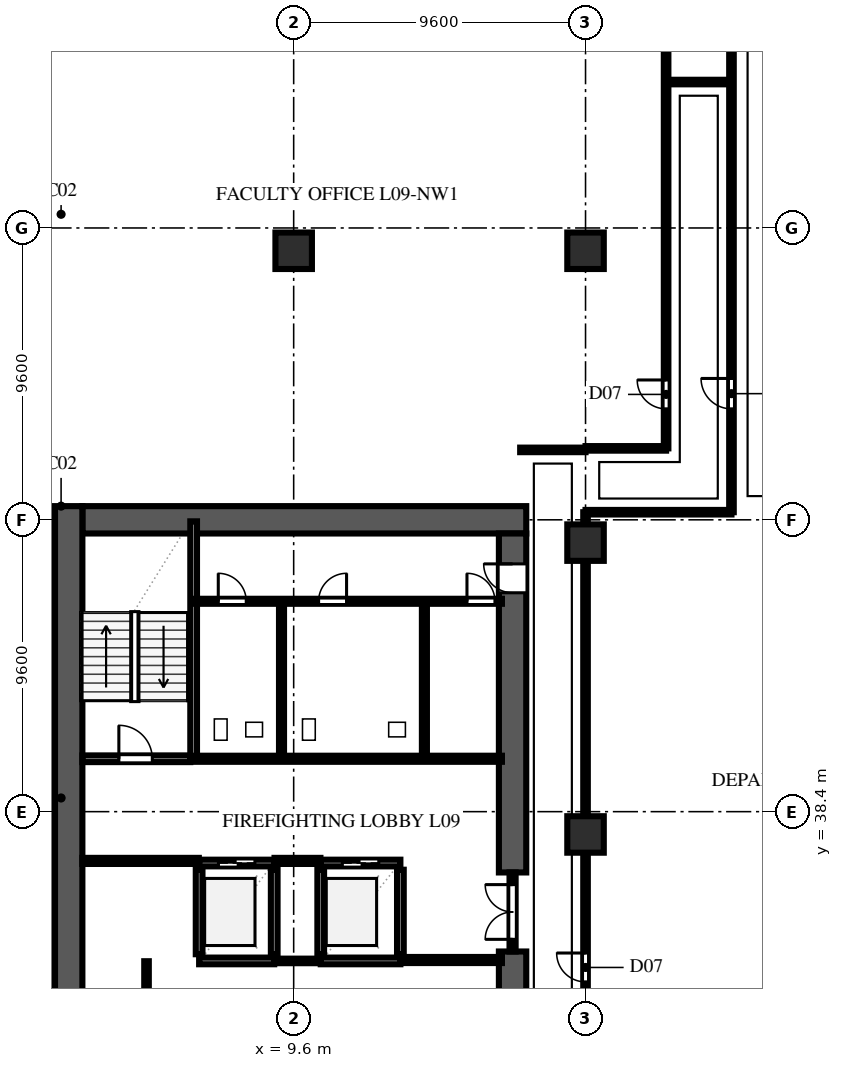
"""IFC4 building model, lengths in metres.
Left out: names, types, materials, properties, quantities, classifications, styles, units other than length and angle.
Written with IfcOpenShell. Run it as: python <this file> out.ifc"""

import sys

from ifc_helpers import new_model, si_unit, direction, frame, frame_2d, origin, origin_2d, place, context, subcontext, project, spatial, rectangle, extrude, element, fill, save


model = new_model("IFC4")
c1 = context("Model", 3, precision=1e-05, world=origin(), true_north=direction((0.0, 1.0)))
c2 = subcontext(c1, "Body", "Model", "MODEL_VIEW")
j1 = project(units=[si_unit("LENGTHUNIT", "METRE"), si_unit("PLANEANGLEUNIT", "RADIAN")], contexts=[c1])
p1 = place(None, origin())
s1 = spatial("IfcSite", under=j1, at=p1, CompositionType="ELEMENT")
p2 = place(p1, origin())
s2 = spatial("IfcBuilding", under=s1, at=p2, CompositionType="ELEMENT")
p3 = place(p2, frame((0.0, 0.0, 39.4)))
s3 = spatial("IfcBuildingStorey", under=s2, at=p3, CompositionType="ELEMENT", Elevation=39.4)
p4 = place(p3, frame((2.65, 48.0, 0.0), z_axis=(0.0, 0.0, 1.0), x_axis=(1.0, 0.0, 0.0)))
e1 = element("IfcWall", 1, at=p4, inside=s3, PredefinedType="SHEAR", context=c2, shape_type="SweptSolid", body=[
    extrude(rectangle(XDim=14.6, YDim=0.9, at=frame_2d((7.3, 0.0))), origin(), (0.0, 0.0, 1.0), 3.54),
])
p5 = place(p3, frame((2.2, 9.15, 0.0), z_axis=(0.0, 0.0, 1.0), x_axis=(0.0, 1.0, 0.0)))
e2 = element("IfcWall", 2, at=p5, inside=s3, PredefinedType="SHEAR", context=c2, shape_type="SweptSolid", body=[
    extrude(rectangle(XDim=39.3, YDim=0.9, at=frame_2d((19.65, 0.0))), origin(), (0.0, 0.0, 1.0), 3.54),
])
p6 = place(p3, frame((16.8, 26.0, 0.0), z_axis=(0.0, 0.0, 1.0), x_axis=(0.0, 1.0, 0.0)))
e3 = element("IfcWall", 3, at=p6, inside=s3, PredefinedType="SHEAR", context=c2, shape_type="SweptSolid", body=[
    extrude(rectangle(XDim=7.8, YDim=0.9, at=frame_2d((3.9, 0.0))), origin(), (0.0, 0.0, 1.0), 3.54),
])
p7 = place(p3, frame((16.8, 36.4, 0.0), z_axis=(0.0, 0.0, 1.0), x_axis=(0.0, 1.0, 0.0)))
e4 = element("IfcWall", 4, at=p7, inside=s3, PredefinedType="SHEAR", context=c2, shape_type="SweptSolid", body=[
    extrude(rectangle(XDim=11.15, YDim=0.9, at=frame_2d((5.575, 0.0))), origin(), (0.0, 0.0, 1.0), 3.54),
])
p8 = place(p7, frame((9.2, 0.0, 0.0)))
e5 = element("IfcOpeningElement", 5, at=p8, cuts=e4, PredefinedType="OPENING", context=c2, shape_type="SweptSolid", body=[
    extrude(rectangle(XDim=0.95, YDim=2.15, at=frame_2d((0.475, 1.075))), frame((0.0, 0.462, 0.0), z_axis=(0.0, -1.0, 0.0), x_axis=(1.0, 0.0, 0.0)), (0.0, 0.0, 1.0), 0.924),
])
for number, where, z_axis, x_axis in (
    (6, (9.6, 56.85, 0.0), (0.0, 0.0, 1.0), (1.0, 0.0, 0.0)),
    (7, (19.2, 37.65, 0.0), (0.0, 0.0, 1.0), (1.0, 0.0, 0.0)),
    (8, (19.2, 47.25, 0.0), (0.0, 0.0, 1.0), (1.0, 0.0, 0.0)),
    (9, (19.2, 56.85, 0.0), (0.0, 0.0, 1.0), (1.0, 0.0, 0.0)),
):
    element("IfcColumn", number, at=place(p3, frame(where, z_axis=z_axis, x_axis=x_axis)), inside=s3, PredefinedType="COLUMN", context=c2, shape_type="SweptSolid", body=[
        extrude(rectangle(XDim=1.2, YDim=1.2, at=origin_2d()), origin(), (0.0, 0.0, 1.0), 3.8),
    ])
p9 = place(p3, frame((2.65, 40.14, 0.0), z_axis=(0.0, 0.0, 1.0), x_axis=(1.0, 0.0, 0.0)))
e10 = element("IfcWall", 10, at=p9, inside=s3, PredefinedType="SOLIDWALL", context=c2, shape_type="SweptSolid", body=[
    extrude(rectangle(XDim=3.55, YDim=0.22, at=frame_2d((1.775, 0.0))), origin(), (0.0, 0.0, 1.0), 3.54),
])
p10 = place(p9, frame((1.2, 0.0, 0.0)))
e11 = element("IfcOpeningElement", 11, at=p10, cuts=e10, PredefinedType="OPENING", context=c2, shape_type="SweptSolid", body=[
    extrude(rectangle(XDim=1.1, YDim=2.2, at=frame_2d((0.55, 1.1))), frame((0.0, 0.122, 0.0), z_axis=(0.0, -1.0, 0.0), x_axis=(1.0, 0.0, 0.0)), (0.0, 0.0, 1.0), 0.244),
])
p11 = place(p3, frame((6.31, 40.14, 0.0), z_axis=(0.0, 0.0, 1.0), x_axis=(0.0, 1.0, 0.0)))
e12 = element("IfcWall", 12, at=p11, inside=s3, PredefinedType="SOLIDWALL", context=c2, shape_type="SweptSolid", body=[
    extrude(rectangle(XDim=7.81, YDim=0.22, at=frame_2d((3.905, 0.0))), origin(), (0.0, 0.0, 1.0), 3.54),
])
for number, where, z_axis, x_axis in (
    (13, (6.49, 33.71, 0.0), (0.0, 0.0, 1.0), (0.0, 1.0, 0.0)),
    (14, (8.96, 33.71, 0.0), (0.0, 0.0, 1.0), (0.0, 1.0, 0.0)),
):
    element("IfcWall", number, at=place(p3, frame(where, z_axis=z_axis, x_axis=x_axis)), inside=s3, PredefinedType="SOLIDWALL", context=c2, shape_type="SweptSolid", body=[
        extrude(rectangle(XDim=2.78, YDim=0.22, at=frame_2d((1.39, 0.0))), origin(), (0.0, 0.0, 1.0), 3.54),
    ])
p12 = place(p3, frame((6.49, 33.49, 0.0), z_axis=(0.0, 0.0, 1.0), x_axis=(1.0, 0.0, 0.0)))
e15 = element("IfcWall", 15, at=p12, inside=s3, PredefinedType="SOLIDWALL", context=c2, shape_type="SweptSolid", body=[
    extrude(rectangle(XDim=2.47, YDim=0.22, at=frame_2d((1.235, 0.0))), origin(), (0.0, 0.0, 1.0), 3.54),
])
p13 = place(p3, frame((6.49, 36.71, 0.0), z_axis=(0.0, 0.0, 1.0), x_axis=(1.0, 0.0, 0.0)))
e16 = element("IfcWall", 16, at=p13, inside=s3, PredefinedType="SOLIDWALL", context=c2, shape_type="SweptSolid", body=[
    extrude(rectangle(XDim=2.47, YDim=0.22, at=frame_2d((1.235, 0.0))), origin(), (0.0, 0.0, 1.0), 3.54),
])
p14 = place(p13, frame((0.635, 0.0, 0.0)))
e17 = element("IfcOpeningElement", 17, at=p14, cuts=e16, PredefinedType="OPENING", context=c2, shape_type="SweptSolid", body=[
    extrude(rectangle(XDim=1.2, YDim=2.2, at=frame_2d((0.6, 1.1))), frame((0.0, 0.122, 0.0), z_axis=(0.0, -1.0, 0.0), x_axis=(1.0, 0.0, 0.0)), (0.0, 0.0, 1.0), 0.244),
])
for number, where, z_axis, x_axis in (
    (18, (10.49, 33.71, 0.0), (0.0, 0.0, 1.0), (0.0, 1.0, 0.0)),
    (19, (13.11, 33.71, 0.0), (0.0, 0.0, 1.0), (0.0, 1.0, 0.0)),
):
    element("IfcWall", number, at=place(p3, frame(where, z_axis=z_axis, x_axis=x_axis)), inside=s3, PredefinedType="SOLIDWALL", context=c2, shape_type="SweptSolid", body=[
        extrude(rectangle(XDim=2.78, YDim=0.22, at=frame_2d((1.39, 0.0))), origin(), (0.0, 0.0, 1.0), 3.54),
    ])
p15 = place(p3, frame((10.49, 33.49, 0.0), z_axis=(0.0, 0.0, 1.0), x_axis=(1.0, 0.0, 0.0)))
e20 = element("IfcWall", 20, at=p15, inside=s3, PredefinedType="SOLIDWALL", context=c2, shape_type="SweptSolid", body=[
    extrude(rectangle(XDim=2.62, YDim=0.22, at=frame_2d((1.31, 0.0))), origin(), (0.0, 0.0, 1.0), 3.54),
])
p16 = place(p3, frame((10.49, 36.71, 0.0), z_axis=(0.0, 0.0, 1.0), x_axis=(1.0, 0.0, 0.0)))
e21 = element("IfcWall", 21, at=p16, inside=s3, PredefinedType="SOLIDWALL", context=c2, shape_type="SweptSolid", body=[
    extrude(rectangle(XDim=2.62, YDim=0.22, at=frame_2d((1.31, 0.0))), origin(), (0.0, 0.0, 1.0), 3.54),
])
p17 = place(p16, frame((0.71, 0.0, 0.0)))
e22 = element("IfcOpeningElement", 22, at=p17, cuts=e21, PredefinedType="OPENING", context=c2, shape_type="SweptSolid", body=[
    extrude(rectangle(XDim=1.2, YDim=2.2, at=frame_2d((0.6, 1.1))), frame((0.0, 0.122, 0.0), z_axis=(0.0, -1.0, 0.0), x_axis=(1.0, 0.0, 0.0)), (0.0, 0.0, 1.0), 0.244),
])
p18 = place(p3, frame((2.65, 36.78, 0.0), z_axis=(0.0, 0.0, 1.0), x_axis=(1.0, 0.0, 0.0)))
e23 = element("IfcWall", 23, at=p18, inside=s3, PredefinedType="SOLIDWALL", context=c2, shape_type="SweptSolid", body=[
    extrude(rectangle(XDim=3.83, YDim=0.2, at=frame_2d((1.915, 0.0))), origin(), (0.0, 0.0, 1.0), 3.54),
])
p19 = place(p3, frame((8.97, 36.78, 0.0), z_axis=(0.0, 0.0, 1.0), x_axis=(1.0, 0.0, 0.0)))
e24 = element("IfcWall", 24, at=p19, inside=s3, PredefinedType="SOLIDWALL", context=c2, shape_type="SweptSolid", body=[
    extrude(rectangle(XDim=1.51, YDim=0.2, at=frame_2d((0.755, 0.0))), origin(), (0.0, 0.0, 1.0), 3.54),
])
p20 = place(p3, frame((13.12, 33.52, 0.0), z_axis=(0.0, 0.0, 1.0), x_axis=(1.0, 0.0, 0.0)))
e25 = element("IfcWall", 25, at=p20, inside=s3, PredefinedType="SOLIDWALL", context=c2, shape_type="SweptSolid", body=[
    extrude(rectangle(XDim=3.33, YDim=0.2, at=frame_2d((1.665, 0.0))), origin(), (0.0, 0.0, 1.0), 3.54),
])
p21 = place(p3, frame((6.32, 40.14, 0.0), z_axis=(0.0, 0.0, 1.0), x_axis=(1.0, 0.0, 0.0)))
e26 = element("IfcWall", 26, at=p21, inside=s3, PredefinedType="SOLIDWALL", context=c2, shape_type="SweptSolid", body=[
    extrude(rectangle(XDim=10.13, YDim=0.2, at=frame_2d((5.065, 0.0))), origin(), (0.0, 0.0, 1.0), 3.54),
])
p22 = place(p3, frame((16.8, 33.8, 0.0), z_axis=(0.0, 0.0, 1.0), x_axis=(0.0, 1.0, 0.0)))
e27 = element("IfcWall", 27, at=p22, inside=s3, PredefinedType="SOLIDWALL", context=c2, shape_type="SweptSolid", body=[
    extrude(rectangle(XDim=2.6, YDim=0.2, at=frame_2d((1.3, 0.0))), origin(), (0.0, 0.0, 1.0), 3.54),
])
p23 = place(p22, frame((0.4, 0.0, 0.0)))
e28 = element("IfcOpeningElement", 28, at=p23, cuts=e27, PredefinedType="OPENING", context=c2, shape_type="SweptSolid", body=[
    extrude(rectangle(XDim=1.8, YDim=2.2, at=frame_2d((0.9, 1.1))), frame((0.0, 0.112, 0.0), z_axis=(0.0, -1.0, 0.0), x_axis=(1.0, 0.0, 0.0)), (0.0, 0.0, 1.0), 0.224),
])
p24 = place(p3, frame((8.965, 33.49, 0.0), z_axis=(0.0, 0.0, 1.0), x_axis=(1.0, 0.0, 0.0)))
e29 = element("IfcWall", 29, at=p24, inside=s3, PredefinedType="PARTITIONING", context=c2, shape_type="SweptSolid", body=[
    extrude(rectangle(XDim=1.52, YDim=0.15, at=frame_2d((0.76, 0.0))), origin(), (0.0, 0.0, 1.0), 3.54),
])
p25 = place(p3, frame((4.76, 30.55, 0.0), z_axis=(0.0, 0.0, 1.0), x_axis=(0.0, 1.0, 0.0)))
e30 = element("IfcWall", 30, at=p25, inside=s3, PredefinedType="PARTITIONING", context=c2, shape_type="SweptSolid", body=[
    extrude(rectangle(XDim=2.93, YDim=0.15, at=frame_2d((1.465, 0.0))), origin(), (0.0, 0.0, 1.0), 3.54),
])
p26 = place(p25, frame((0.6, 0.0, 0.0)))
e31 = element("IfcOpeningElement", 31, at=p26, cuts=e30, PredefinedType="OPENING", context=c2, shape_type="SweptSolid", body=[
    extrude(rectangle(XDim=0.85, YDim=2.1, at=frame_2d((0.425, 1.05))), frame((0.0, 0.087, 0.0), z_axis=(0.0, -1.0, 0.0), x_axis=(1.0, 0.0, 0.0)), (0.0, 0.0, 1.0), 0.174),
])
p27 = place(p3, frame((6.32, 45.32, 0.0), z_axis=(0.0, 0.0, 1.0), x_axis=(1.0, 0.0, 0.0)))
e32 = element("IfcWall", 32, at=p27, inside=s3, PredefinedType="PLUMBINGWALL", context=c2, shape_type="SweptSolid", body=[
    extrude(rectangle(XDim=10.13, YDim=0.165, at=frame_2d((5.065, 0.0))), origin(), (0.0, 0.0, 1.0), 3.54),
])
p28 = place(p27, frame((0.8, 0.0, 0.0)))
e33 = element("IfcOpeningElement", 33, at=p28, cuts=e32, PredefinedType="OPENING", context=c2, shape_type="SweptSolid", body=[
    extrude(rectangle(XDim=0.92, YDim=2.15, at=frame_2d((0.46, 1.075))), frame((0.0, 0.094, 0.0), z_axis=(0.0, -1.0, 0.0), x_axis=(1.0, 0.0, 0.0)), (0.0, 0.0, 1.0), 0.189),
])
p29 = place(p27, frame((4.1, 0.0, 0.0)))
e34 = element("IfcOpeningElement", 34, at=p29, cuts=e32, PredefinedType="OPENING", context=c2, shape_type="SweptSolid", body=[
    extrude(rectangle(XDim=0.92, YDim=2.15, at=frame_2d((0.46, 1.075))), frame((0.0, 0.094, 0.0), z_axis=(0.0, -1.0, 0.0), x_axis=(1.0, 0.0, 0.0)), (0.0, 0.0, 1.0), 0.189),
])
p30 = place(p27, frame((8.98, 0.0, 0.0)))
e35 = element("IfcOpeningElement", 35, at=p30, cuts=e32, PredefinedType="OPENING", context=c2, shape_type="SweptSolid", body=[
    extrude(rectangle(XDim=0.92, YDim=2.15, at=frame_2d((0.46, 1.075))), frame((0.0, 0.094, 0.0), z_axis=(0.0, -1.0, 0.0), x_axis=(1.0, 0.0, 0.0)), (0.0, 0.0, 1.0), 0.189),
])
for number, where, z_axis, x_axis in (
    (36, (9.2, 40.4, 0.0), (0.0, 0.0, 1.0), (0.0, 1.0, 0.0)),
    (37, (13.9, 40.4, 0.0), (0.0, 0.0, 1.0), (0.0, 1.0, 0.0)),
):
    element("IfcWall", number, at=place(p3, frame(where, z_axis=z_axis, x_axis=x_axis)), inside=s3, PredefinedType="PLUMBINGWALL", context=c2, shape_type="SweptSolid", body=[
        extrude(rectangle(XDim=4.92, YDim=0.165, at=frame_2d((2.46, 0.0))), origin(), (0.0, 0.0, 1.0), 3.54),
    ])
p31 = place(p3, frame((0.85, 48.0, 0.0), z_axis=(0.0, 0.0, 1.0), x_axis=(1.0, 0.0, 0.0)))
e38 = element("IfcWall", 38, at=p31, inside=s3, PredefinedType="SOLIDWALL", context=c2, shape_type="SweptSolid", body=[
    extrude(rectangle(XDim=0.895, YDim=0.2, at=frame_2d((0.448, 0.0))), origin(), (0.0, 0.0, 1.0), 3.54),
])
p32 = place(p3, frame((17.05, 50.3, 0.0), z_axis=(0.0, 0.0, 1.0), x_axis=(1.0, 0.0, 0.0)))
e39 = element("IfcWall", 39, at=p32, inside=s3, PredefinedType="PARTITIONING", context=c2, shape_type="SweptSolid", body=[
    extrude(rectangle(XDim=2.15, YDim=0.15, at=frame_2d((1.075, 0.0))), origin(), (0.0, 0.0, 1.0), 3.54),
])
p33 = place(p3, frame((19.2, 23.45, 0.0), z_axis=(0.0, 0.0, 1.0), x_axis=(0.0, 1.0, 0.0)))
e40 = element("IfcWall", 40, at=p33, inside=s3, PredefinedType="PARTITIONING", context=c2, shape_type="SweptSolid", body=[
    extrude(rectangle(XDim=24.8, YDim=0.15, at=frame_2d((12.4, 0.0))), origin(), (0.0, 0.0, 1.0), 3.123),
])
p34 = place(p33, frame((9.35, 0.0, 0.0)))
e41 = element("IfcOpeningElement", 41, at=p34, cuts=e40, PredefinedType="OPENING", context=c2, shape_type="SweptSolid", body=[
    extrude(rectangle(XDim=0.95, YDim=2.15, at=frame_2d((0.475, 1.075))), frame((0.0, 0.087, 0.0), z_axis=(0.0, -1.0, 0.0), x_axis=(1.0, 0.0, 0.0)), (0.0, 0.0, 1.0), 0.174),
])
p35 = place(p3, frame((19.2, 48.25, 0.0), z_axis=(0.0, 0.0, 1.0), x_axis=(1.0, 0.0, 0.0)))
e42 = element("IfcWall", 42, at=p35, inside=s3, PredefinedType="PARTITIONING", context=c2, shape_type="SweptSolid", body=[
    extrude(rectangle(XDim=4.8, YDim=0.15, at=frame_2d((2.4, 0.0))), origin(), (0.0, 0.0, 1.0), 3.54),
])
p36 = place(p3, frame((19.2, 50.35, 0.0), z_axis=(0.0, 0.0, 1.0), x_axis=(1.0, 0.0, 0.0)))
e43 = element("IfcWall", 43, at=p36, inside=s3, PredefinedType="PARTITIONING", context=c2, shape_type="SweptSolid", body=[
    extrude(rectangle(XDim=2.65, YDim=0.15, at=frame_2d((1.325, 0.0))), origin(), (0.0, 0.0, 1.0), 3.54),
])
p37 = place(p3, frame((21.85, 62.4, 0.0), z_axis=(0.0, 0.0, 1.0), x_axis=(1.0, 0.0, 0.0)))
e44 = element("IfcWall", 44, at=p37, inside=s3, PredefinedType="PARTITIONING", context=c2, shape_type="SweptSolid", body=[
    extrude(rectangle(XDim=2.15, YDim=0.15, at=frame_2d((1.075, 0.0))), origin(), (0.0, 0.0, 1.0), 3.54),
])
p38 = place(p3, frame((24.0, 48.25, 0.0), z_axis=(0.0, 0.0, 1.0), x_axis=(0.0, 1.0, 0.0)))
e45 = element("IfcWall", 45, at=p38, inside=s3, PredefinedType="PARTITIONING", context=c2, shape_type="SweptSolid", body=[
    extrude(rectangle(XDim=18.11, YDim=0.15, at=frame_2d((9.055, 0.0))), origin(), (0.0, 0.0, 1.0), 3.133),
])
p39 = place(p38, frame((3.4, 0.0, 0.0)))
e46 = element("IfcOpeningElement", 46, at=p39, cuts=e45, PredefinedType="OPENING", context=c2, shape_type="SweptSolid", body=[
    extrude(rectangle(XDim=1.0, YDim=2.2, at=frame_2d((0.5, 1.1))), frame((0.0, 0.087, 0.0), z_axis=(0.0, -1.0, 0.0), x_axis=(1.0, 0.0, 0.0)), (0.0, 0.0, 1.0), 0.174),
])
p40 = place(p3, frame((21.85, 50.35, 0.0), z_axis=(0.0, 0.0, 1.0), x_axis=(0.0, 1.0, 0.0)))
e47 = element("IfcWall", 47, at=p40, inside=s3, PredefinedType="PARTITIONING", context=c2, shape_type="SweptSolid", body=[
    extrude(rectangle(XDim=16.63, YDim=0.15, at=frame_2d((8.315, 0.0))), origin(), (0.0, 0.0, 1.0), 3.54),
])
p41 = place(p40, frame((1.3, 0.0, 0.0)))
e48 = element("IfcOpeningElement", 48, at=p41, cuts=e47, PredefinedType="OPENING", context=c2, shape_type="SweptSolid", body=[
    extrude(rectangle(XDim=0.95, YDim=2.15, at=frame_2d((0.475, 1.075))), frame((0.0, 0.087, 0.0), z_axis=(0.0, -1.0, 0.0), x_axis=(1.0, 0.0, 0.0)), (0.0, 0.0, 1.0), 0.174),
])
p42 = place(p10, origin())
e49 = element("IfcDoor", 49, at=p42, inside=s3, OperationType="SINGLE_SWING_LEFT", PredefinedType="DOOR", context=c2, shape_type="SweptSolid", body=[
    extrude(rectangle(XDim=1.1, YDim=2.2, at=frame_2d((0.55, 1.1))), frame((0.0, 0.025, 0.0), z_axis=(0.0, -1.0, 0.0), x_axis=(1.0, 0.0, 0.0)), (0.0, 0.0, 1.0), 0.05),
])
fill(e11, e49)
p43 = place(p14, origin())
e50 = element("IfcDoor", 50, at=p43, inside=s3, OperationType="DOUBLE_DOOR_SLIDING", PredefinedType="DOOR", context=c2, shape_type="SweptSolid", body=[
    extrude(rectangle(XDim=1.2, YDim=2.2, at=frame_2d((0.6, 1.1))), frame((0.0, 0.025, 0.0), z_axis=(0.0, -1.0, 0.0), x_axis=(1.0, 0.0, 0.0)), (0.0, 0.0, 1.0), 0.05),
])
fill(e17, e50)
p44 = place(p17, origin())
e51 = element("IfcDoor", 51, at=p44, inside=s3, OperationType="DOUBLE_DOOR_SLIDING", PredefinedType="DOOR", context=c2, shape_type="SweptSolid", body=[
    extrude(rectangle(XDim=1.2, YDim=2.2, at=frame_2d((0.6, 1.1))), frame((0.0, 0.025, 0.0), z_axis=(0.0, -1.0, 0.0), x_axis=(1.0, 0.0, 0.0)), (0.0, 0.0, 1.0), 0.05),
])
fill(e22, e51)
p45 = place(p8, origin())
e52 = element("IfcDoor", 52, at=p45, inside=s3, OperationType="SINGLE_SWING_RIGHT", PredefinedType="DOOR", context=c2, shape_type="SweptSolid", body=[
    extrude(rectangle(XDim=0.95, YDim=2.15, at=frame_2d((0.475, 1.075))), frame((0.0, 0.025, 0.0), z_axis=(0.0, -1.0, 0.0), x_axis=(1.0, 0.0, 0.0)), (0.0, 0.0, 1.0), 0.05),
])
fill(e5, e52)
p46 = place(p23, origin())
e53 = element("IfcDoor", 53, at=p46, inside=s3, OperationType="DOUBLE_DOOR_SINGLE_SWING", PredefinedType="DOOR", context=c2, shape_type="SweptSolid", body=[
    extrude(rectangle(XDim=1.8, YDim=2.2, at=frame_2d((0.9, 1.1))), frame((0.0, 0.025, 0.0), z_axis=(0.0, -1.0, 0.0), x_axis=(1.0, 0.0, 0.0)), (0.0, 0.0, 1.0), 0.05),
])
fill(e28, e53)
p47 = place(p28, origin())
e54 = element("IfcDoor", 54, at=p47, inside=s3, OperationType="SINGLE_SWING_LEFT", PredefinedType="DOOR", context=c2, shape_type="SweptSolid", body=[
    extrude(rectangle(XDim=0.92, YDim=2.15, at=frame_2d((0.46, 1.075))), frame((0.0, 0.025, 0.0), z_axis=(0.0, -1.0, 0.0), x_axis=(1.0, 0.0, 0.0)), (0.0, 0.0, 1.0), 0.05),
])
fill(e33, e54)
p48 = place(p29, origin())
e55 = element("IfcDoor", 55, at=p48, inside=s3, OperationType="SINGLE_SWING_RIGHT", PredefinedType="DOOR", context=c2, shape_type="SweptSolid", body=[
    extrude(rectangle(XDim=0.92, YDim=2.15, at=frame_2d((0.46, 1.075))), frame((0.0, 0.025, 0.0), z_axis=(0.0, -1.0, 0.0), x_axis=(1.0, 0.0, 0.0)), (0.0, 0.0, 1.0), 0.05),
])
fill(e34, e55)
p49 = place(p30, origin())
e56 = element("IfcDoor", 56, at=p49, inside=s3, OperationType="SINGLE_SWING_LEFT", PredefinedType="DOOR", context=c2, shape_type="SweptSolid", body=[
    extrude(rectangle(XDim=0.92, YDim=2.15, at=frame_2d((0.46, 1.075))), frame((0.0, 0.025, 0.0), z_axis=(0.0, -1.0, 0.0), x_axis=(1.0, 0.0, 0.0)), (0.0, 0.0, 1.0), 0.05),
])
fill(e35, e56)
p50 = place(p34, origin())
e57 = element("IfcDoor", 57, at=p50, inside=s3, OperationType="SINGLE_SWING_RIGHT", PredefinedType="DOOR", context=c2, shape_type="SweptSolid", body=[
    extrude(rectangle(XDim=0.95, YDim=2.15, at=frame_2d((0.475, 1.075))), frame((0.0, 0.025, 0.0), z_axis=(0.0, -1.0, 0.0), x_axis=(1.0, 0.0, 0.0)), (0.0, 0.0, 1.0), 0.05),
])
fill(e41, e57)
p51 = place(p39, origin())
e58 = element("IfcDoor", 58, at=p51, inside=s3, OperationType="SINGLE_SWING_RIGHT", PredefinedType="DOOR", context=c2, shape_type="SweptSolid", body=[
    extrude(rectangle(XDim=1.0, YDim=2.2, at=frame_2d((0.5, 1.1))), frame((0.0, 0.025, 0.0), z_axis=(0.0, -1.0, 0.0), x_axis=(1.0, 0.0, 0.0)), (0.0, 0.0, 1.0), 0.05),
])
fill(e46, e58)
p52 = place(p41, origin())
e59 = element("IfcDoor", 59, at=p52, inside=s3, OperationType="SINGLE_SWING_RIGHT", PredefinedType="DOOR", context=c2, shape_type="SweptSolid", body=[
    extrude(rectangle(XDim=0.95, YDim=2.15, at=frame_2d((0.475, 1.075))), frame((0.0, 0.025, 0.0), z_axis=(0.0, -1.0, 0.0), x_axis=(1.0, 0.0, 0.0)), (0.0, 0.0, 1.0), 0.05),
])
fill(e48, e59)
save(model, sys.argv[1])
